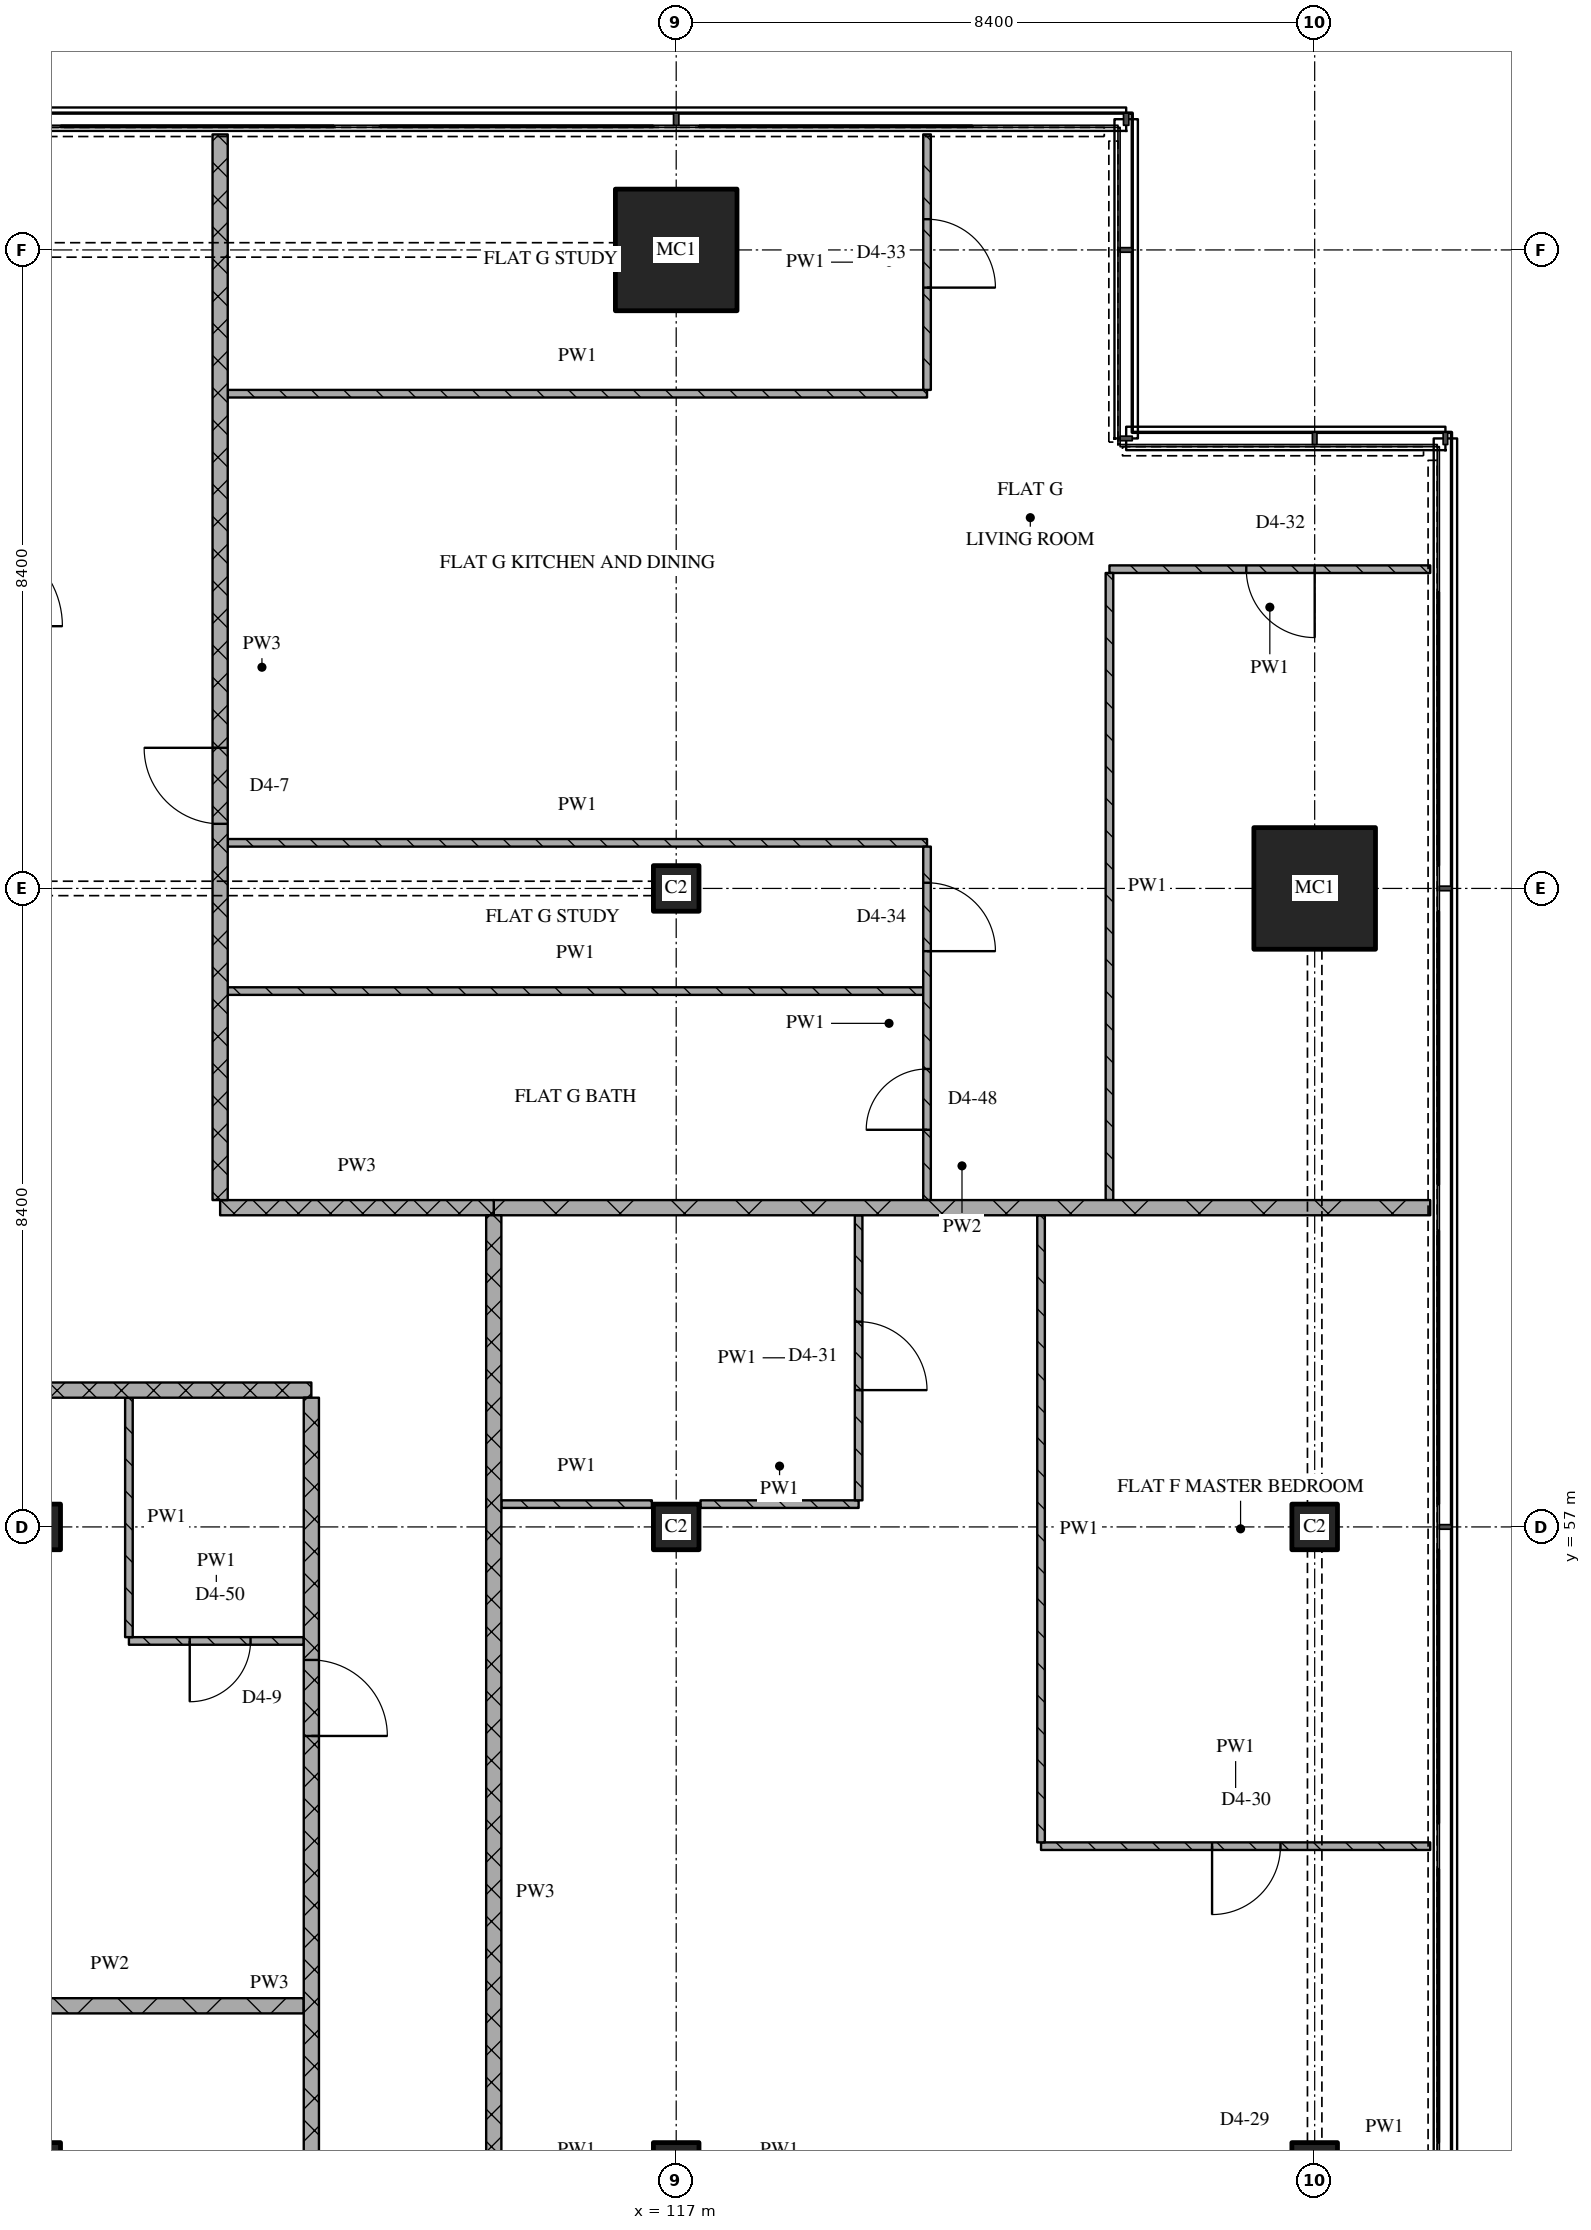
"""IFC4 building model, lengths in metres.
Left out: names, types, materials, properties, quantities, classifications, styles, units other than length and angle.
Written with IfcOpenShell. Run it as: python <this file> out.ifc"""

import sys

from ifc_helpers import new_model, si_unit, direction, frame, frame_2d, origin, origin_2d, place, context, subcontext, project, spatial, rectangle, extrude, element, fill, save


model = new_model("IFC4")
c1 = context("Model", 3, precision=1e-05, world=origin(), true_north=direction((0.0, 1.0)))
c2 = subcontext(c1, "Body", "Model", "MODEL_VIEW")
j1 = project(units=[si_unit("LENGTHUNIT", "METRE"), si_unit("PLANEANGLEUNIT", "RADIAN")], contexts=[c1])
p1 = place(None, origin())
s1 = spatial("IfcSite", under=j1, at=p1, CompositionType="ELEMENT")
p2 = place(p1, origin())
s2 = spatial("IfcBuilding", under=s1, at=p2, CompositionType="ELEMENT")
p3 = place(p2, frame((0.0, 0.0, 237.9)))
s3 = spatial("IfcBuildingStorey", under=s2, at=p3, CompositionType="ELEMENT", Elevation=237.9)
for number, where, z_axis, x_axis in (
    (1, (108.6, 48.6, 0.0), (0.0, 0.0, 1.0), (1.0, 0.0, 0.0)),
    (2, (108.6, 57.0, 0.0), (0.0, 0.0, 1.0), (1.0, 0.0, 0.0)),
    (3, (117.0, 48.6, 0.0), (0.0, 0.0, 1.0), (1.0, 0.0, 0.0)),
    (4, (117.0, 57.0, 0.0), (0.0, 0.0, 1.0), (1.0, 0.0, 0.0)),
    (5, (117.0, 65.4, 0.0), (0.0, 0.0, 1.0), (1.0, 0.0, 0.0)),
):
    element("IfcColumn", number, at=place(p3, frame(where, z_axis=z_axis, x_axis=x_axis)), inside=s3, PredefinedType="COLUMN", context=c2, shape_type="SweptSolid", body=[
        extrude(rectangle(XDim=0.6, YDim=0.6, at=origin_2d()), origin(), (0.0, 0.0, 1.0), 3.6),
    ])
p4 = place(p3, frame((117.0, 73.8, 0.0), z_axis=(0.0, 0.0, 1.0), x_axis=(1.0, 0.0, 0.0)))
e6 = element("IfcColumn", 6, at=p4, inside=s3, PredefinedType="COLUMN", context=c2, shape_type="SweptSolid", body=[
    extrude(rectangle(XDim=1.6, YDim=1.6, at=origin_2d()), origin(), (0.0, 0.0, 1.0), 3.6),
])
for number, where, z_axis, x_axis in (
    (7, (125.4, 48.6, 0.0), (0.0, 0.0, 1.0), (1.0, 0.0, 0.0)),
    (8, (125.4, 57.0, 0.0), (0.0, 0.0, 1.0), (1.0, 0.0, 0.0)),
):
    element("IfcColumn", number, at=place(p3, frame(where, z_axis=z_axis, x_axis=x_axis)), inside=s3, PredefinedType="COLUMN", context=c2, shape_type="SweptSolid", body=[
        extrude(rectangle(XDim=0.6, YDim=0.6, at=origin_2d()), origin(), (0.0, 0.0, 1.0), 3.6),
    ])
p5 = place(p3, frame((125.4, 65.4, 0.0), z_axis=(0.0, 0.0, 1.0), x_axis=(1.0, 0.0, 0.0)))
e9 = element("IfcColumn", 9, at=p5, inside=s3, PredefinedType="COLUMN", context=c2, shape_type="SweptSolid", body=[
    extrude(rectangle(XDim=1.6, YDim=1.6, at=origin_2d()), origin(), (0.0, 0.0, 1.0), 3.6),
])
p6 = place(p3, frame((107.0, 50.7, 0.0), z_axis=(0.0, 0.0, 1.0), x_axis=(1.0, 0.0, 0.0)))
e10 = element("IfcWall", 10, at=p6, inside=s3, PredefinedType="PARTITIONING", context=c2, shape_type="SweptSolid", body=[
    extrude(rectangle(XDim=5.1, YDim=0.2, at=frame_2d((2.55, 0.0))), origin(), (0.0, 0.0, 1.0), 3.32),
])
p7 = place(p3, frame((121.8, 52.8, 0.0), z_axis=(0.0, 0.0, 1.0), x_axis=(1.0, 0.0, 0.0)))
e11 = element("IfcWall", 11, at=p7, inside=s3, PredefinedType="PARTITIONING", context=c2, shape_type="SweptSolid", body=[
    extrude(rectangle(XDim=5.12, YDim=0.1, at=frame_2d((2.56, 0.0))), origin(), (0.0, 0.0, 1.0), 3.32),
])
p8 = place(p7, frame((2.25, 0.0, 0.0)))
e12 = element("IfcOpeningElement", 12, at=p8, cuts=e11, PredefinedType="OPENING", context=c2, shape_type="SweptSolid", body=[
    extrude(rectangle(XDim=0.9, YDim=2.1, at=frame_2d((0.45, 1.05))), frame((0.0, 0.06, 0.0), z_axis=(0.0, -1.0, 0.0), x_axis=(1.0, 0.0, 0.0)), (0.0, 0.0, 1.0), 0.12),
])
p9 = place(p3, frame((109.8, 55.5, 0.0), z_axis=(0.0, 0.0, 1.0), x_axis=(1.0, 0.0, 0.0)))
e13 = element("IfcWall", 13, at=p9, inside=s3, PredefinedType="PARTITIONING", context=c2, shape_type="SweptSolid", body=[
    extrude(rectangle(XDim=2.3, YDim=0.1, at=frame_2d((1.15, 0.0))), origin(), (0.0, 0.0, 1.0), 3.32),
])
p10 = place(p9, frame((0.8, 0.0, 0.0)))
e14 = element("IfcOpeningElement", 14, at=p10, cuts=e13, PredefinedType="OPENING", context=c2, shape_type="SweptSolid", body=[
    extrude(rectangle(XDim=0.8, YDim=2.1, at=frame_2d((0.4, 1.05))), frame((0.0, 0.06, 0.0), z_axis=(0.0, -1.0, 0.0), x_axis=(1.0, 0.0, 0.0)), (0.0, 0.0, 1.0), 0.12),
])
p11 = place(p3, frame((114.7, 57.3, 0.0), z_axis=(0.0, 0.0, 1.0), x_axis=(1.0, 0.0, 0.0)))
e15 = element("IfcWall", 15, at=p11, inside=s3, PredefinedType="PARTITIONING", context=c2, shape_type="SweptSolid", body=[
    extrude(rectangle(XDim=1.98, YDim=0.1, at=frame_2d((0.99, 0.0))), origin(), (0.0, 0.0, 1.0), 3.32),
])
p12 = place(p3, frame((117.32, 57.3, 0.0), z_axis=(0.0, 0.0, 1.0), x_axis=(1.0, 0.0, 0.0)))
e16 = element("IfcWall", 16, at=p12, inside=s3, PredefinedType="PARTITIONING", context=c2, shape_type="SweptSolid", body=[
    extrude(rectangle(XDim=2.08, YDim=0.1, at=frame_2d((1.04, 0.0))), origin(), (0.0, 0.0, 1.0), 3.32),
])
p13 = place(p3, frame((101.4, 58.8, 0.0), z_axis=(0.0, 0.0, 1.0), x_axis=(1.0, 0.0, 0.0)))
e17 = element("IfcWall", 17, at=p13, inside=s3, PredefinedType="PARTITIONING", context=c2, shape_type="SweptSolid", body=[
    extrude(rectangle(XDim=10.8, YDim=0.2, at=frame_2d((5.4, 0.0))), origin(), (0.0, 0.0, 1.0), 3.32),
])
p14 = place(p3, frame((111.0, 61.2, 0.0), z_axis=(0.0, 0.0, 1.0), x_axis=(1.0, 0.0, 0.0)))
e18 = element("IfcWall", 18, at=p14, inside=s3, PredefinedType="PARTITIONING", context=c2, shape_type="SweptSolid", body=[
    extrude(rectangle(XDim=3.6, YDim=0.2, at=frame_2d((1.8, 0.0))), origin(), (0.0, 0.0, 1.0), 3.32),
])
p15 = place(p3, frame((114.6, 61.2, 0.0), z_axis=(0.0, 0.0, 1.0), x_axis=(1.0, 0.0, 0.0)))
e19 = element("IfcWall", 19, at=p15, inside=s3, PredefinedType="PARTITIONING", context=c2, shape_type="SweptSolid", body=[
    extrude(rectangle(XDim=12.32, YDim=0.2, at=frame_2d((6.16, 0.0))), origin(), (0.0, 0.0, 1.0), 3.32),
])
p16 = place(p3, frame((111.1, 64.05, 0.0), z_axis=(0.0, 0.0, 1.0), x_axis=(1.0, 0.0, 0.0)))
e20 = element("IfcWall", 20, at=p16, inside=s3, PredefinedType="PARTITIONING", context=c2, shape_type="SweptSolid", body=[
    extrude(rectangle(XDim=9.15, YDim=0.1, at=frame_2d((4.575, 0.0))), origin(), (0.0, 0.0, 1.0), 3.32),
])
p17 = place(p3, frame((111.1, 66.0, 0.0), z_axis=(0.0, 0.0, 1.0), x_axis=(1.0, 0.0, 0.0)))
e21 = element("IfcWall", 21, at=p17, inside=s3, PredefinedType="PARTITIONING", context=c2, shape_type="SweptSolid", body=[
    extrude(rectangle(XDim=9.2, YDim=0.1, at=frame_2d((4.6, 0.0))), origin(), (0.0, 0.0, 1.0), 3.32),
])
p18 = place(p3, frame((126.92, 69.6, 0.0), z_axis=(0.0, 0.0, 1.0), x_axis=(-1.0, 0.0, 0.0)))
e22 = element("IfcWall", 22, at=p18, inside=s3, PredefinedType="PARTITIONING", context=c2, shape_type="SweptSolid", body=[
    extrude(rectangle(XDim=4.22, YDim=0.1, at=frame_2d((2.11, 0.0))), origin(), (0.0, 0.0, 1.0), 3.32),
])
p19 = place(p18, frame((1.52, 0.0, 0.0)))
e23 = element("IfcOpeningElement", 23, at=p19, cuts=e22, PredefinedType="OPENING", context=c2, shape_type="SweptSolid", body=[
    extrude(rectangle(XDim=0.9, YDim=2.1, at=frame_2d((0.45, 1.05))), frame((0.0, 0.06, 0.0), z_axis=(0.0, -1.0, 0.0), x_axis=(1.0, 0.0, 0.0)), (0.0, 0.0, 1.0), 0.12),
])
p20 = place(p3, frame((111.1, 71.909, 0.0), z_axis=(0.0, 0.0, 1.0), x_axis=(1.0, 0.0, 0.0)))
e24 = element("IfcWall", 24, at=p20, inside=s3, PredefinedType="PARTITIONING", context=c2, shape_type="SweptSolid", body=[
    extrude(rectangle(XDim=9.2, YDim=0.1, at=frame_2d((4.6, 0.0))), origin(), (0.0, 0.0, 1.0), 3.32),
])
p21 = place(p3, frame((109.8, 58.7, 0.0), z_axis=(0.0, 0.0, 1.0), x_axis=(0.0, -1.0, 0.0)))
e25 = element("IfcWall", 25, at=p21, inside=s3, PredefinedType="PARTITIONING", context=c2, shape_type="SweptSolid", body=[
    extrude(rectangle(XDim=3.15, YDim=0.1, at=frame_2d((1.575, 0.0))), origin(), (0.0, 0.0, 1.0), 3.32),
])
p22 = place(p3, frame((111.0, 75.32, 0.0), z_axis=(0.0, 0.0, 1.0), x_axis=(0.0, -1.0, 0.0)))
e26 = element("IfcWall", 26, at=p22, inside=s3, PredefinedType="PARTITIONING", context=c2, shape_type="SweptSolid", body=[
    extrude(rectangle(XDim=14.02, YDim=0.2, at=frame_2d((7.01, 0.0))), origin(), (0.0, 0.0, 1.0), 3.32),
])
p23 = place(p22, frame((8.07, 0.0, 0.0)))
e27 = element("IfcOpeningElement", 27, at=p23, cuts=e26, PredefinedType="OPENING", context=c2, shape_type="SweptSolid", body=[
    extrude(rectangle(XDim=1.0, YDim=2.1, at=frame_2d((0.5, 1.05))), frame((0.0, 0.11, 0.0), z_axis=(0.0, -1.0, 0.0), x_axis=(1.0, 0.0, 0.0)), (0.0, 0.0, 1.0), 0.22),
])
p24 = place(p3, frame((112.2, 43.3, 0.0), z_axis=(0.0, 0.0, 1.0), x_axis=(0.0, 1.0, 0.0)))
e28 = element("IfcWall", 28, at=p24, inside=s3, PredefinedType="PARTITIONING", context=c2, shape_type="SweptSolid", body=[
    extrude(rectangle(XDim=15.4, YDim=0.2, at=frame_2d((7.7, 0.0))), origin(), (0.0, 0.0, 1.0), 3.32),
])
p25 = place(p24, frame((10.95, 0.0, 0.0)))
e29 = element("IfcOpeningElement", 29, at=p25, cuts=e28, PredefinedType="OPENING", context=c2, shape_type="SweptSolid", body=[
    extrude(rectangle(XDim=1.0, YDim=2.1, at=frame_2d((0.5, 1.05))), frame((0.0, 0.11, 0.0), z_axis=(0.0, -1.0, 0.0), x_axis=(1.0, 0.0, 0.0)), (0.0, 0.0, 1.0), 0.22),
])
p26 = place(p3, frame((114.6, 61.1, 0.0), z_axis=(0.0, 0.0, 1.0), x_axis=(0.0, -1.0, 0.0)))
e30 = element("IfcWall", 30, at=p26, inside=s3, PredefinedType="PARTITIONING", context=c2, shape_type="SweptSolid", body=[
    extrude(rectangle(XDim=17.8, YDim=0.2, at=frame_2d((8.9, 0.0))), origin(), (0.0, 0.0, 1.0), 3.32),
])
p27 = place(p3, frame((119.4, 57.35, 0.0), z_axis=(0.0, 0.0, 1.0), x_axis=(0.0, 1.0, 0.0)))
e31 = element("IfcWall", 31, at=p27, inside=s3, PredefinedType="PARTITIONING", context=c2, shape_type="SweptSolid", body=[
    extrude(rectangle(XDim=3.75, YDim=0.1, at=frame_2d((1.875, 0.0))), origin(), (0.0, 0.0, 1.0), 3.32),
])
p28 = place(p27, frame((1.45, 0.0, 0.0)))
e32 = element("IfcOpeningElement", 32, at=p28, cuts=e31, PredefinedType="OPENING", context=c2, shape_type="SweptSolid", body=[
    extrude(rectangle(XDim=0.9, YDim=2.1, at=frame_2d((0.45, 1.05))), frame((0.0, 0.06, 0.0), z_axis=(0.0, -1.0, 0.0), x_axis=(1.0, 0.0, 0.0)), (0.0, 0.0, 1.0), 0.12),
])
p29 = place(p3, frame((120.3, 61.3, 0.0), z_axis=(0.0, 0.0, 1.0), x_axis=(0.0, 1.0, 0.0)))
e33 = element("IfcWall", 33, at=p29, inside=s3, PredefinedType="PARTITIONING", context=c2, shape_type="SweptSolid", body=[
    extrude(rectangle(XDim=4.65, YDim=0.1, at=frame_2d((2.325, 0.0))), origin(), (0.0, 0.0, 1.0), 3.32),
])
p30 = place(p29, frame((0.925, 0.0, 0.0)))
e34 = element("IfcOpeningElement", 34, at=p30, cuts=e33, PredefinedType="OPENING", context=c2, shape_type="SweptSolid", body=[
    extrude(rectangle(XDim=0.8, YDim=2.1, at=frame_2d((0.4, 1.05))), frame((0.0, 0.06, 0.0), z_axis=(0.0, -1.0, 0.0), x_axis=(1.0, 0.0, 0.0)), (0.0, 0.0, 1.0), 0.12),
])
p31 = place(p29, frame((3.275, 0.0, 0.0)))
e35 = element("IfcOpeningElement", 35, at=p31, cuts=e33, PredefinedType="OPENING", context=c2, shape_type="SweptSolid", body=[
    extrude(rectangle(XDim=0.9, YDim=2.1, at=frame_2d((0.45, 1.05))), frame((0.0, 0.06, 0.0), z_axis=(0.0, -1.0, 0.0), x_axis=(1.0, 0.0, 0.0)), (0.0, 0.0, 1.0), 0.12),
])
p32 = place(p3, frame((120.3, 71.958, 0.0), z_axis=(0.0, 0.0, 1.0), x_axis=(0.0, 1.0, 0.0)))
e36 = element("IfcWall", 36, at=p32, inside=s3, PredefinedType="PARTITIONING", context=c2, shape_type="SweptSolid", body=[
    extrude(rectangle(XDim=3.362, YDim=0.1, at=frame_2d((1.681, 0.0))), origin(), (0.0, 0.0, 1.0), 3.32),
])
p33 = place(p32, frame((1.346, 0.0, 0.0)))
e37 = element("IfcOpeningElement", 37, at=p33, cuts=e36, PredefinedType="OPENING", context=c2, shape_type="SweptSolid", body=[
    extrude(rectangle(XDim=0.9, YDim=2.1, at=frame_2d((0.45, 1.05))), frame((0.0, 0.06, 0.0), z_axis=(0.0, -1.0, 0.0), x_axis=(1.0, 0.0, 0.0)), (0.0, 0.0, 1.0), 0.12),
])
for number, where, z_axis, x_axis in (
    (38, (121.8, 61.1, 0.0), (0.0, 0.0, 1.0), (0.0, -1.0, 0.0)),
    (39, (122.7, 69.55, 0.0), (0.0, 0.0, 1.0), (0.0, -1.0, 0.0)),
):
    element("IfcWall", number, at=place(p3, frame(where, z_axis=z_axis, x_axis=x_axis)), inside=s3, PredefinedType="PARTITIONING", context=c2, shape_type="SweptSolid", body=[
        extrude(rectangle(XDim=8.25, YDim=0.1, at=frame_2d((4.125, 0.0))), origin(), (0.0, 0.0, 1.0), 3.32),
    ])
p34 = place(p8, origin())
e40 = element("IfcDoor", 40, at=p34, inside=s3, OperationType="SINGLE_SWING_RIGHT", PredefinedType="DOOR", context=c2, shape_type="SweptSolid", body=[
    extrude(rectangle(XDim=0.9, YDim=2.1, at=frame_2d((0.45, 1.05))), frame((0.0, 0.025, 0.0), z_axis=(0.0, -1.0, 0.0), x_axis=(1.0, 0.0, 0.0)), (0.0, 0.0, 1.0), 0.05),
])
fill(e12, e40)
p35 = place(p10, origin())
e41 = element("IfcDoor", 41, at=p35, inside=s3, OperationType="SINGLE_SWING_RIGHT", PredefinedType="DOOR", context=c2, shape_type="SweptSolid", body=[
    extrude(rectangle(XDim=0.8, YDim=2.1, at=frame_2d((0.4, 1.05))), frame((0.0, 0.025, 0.0), z_axis=(0.0, -1.0, 0.0), x_axis=(1.0, 0.0, 0.0)), (0.0, 0.0, 1.0), 0.05),
])
fill(e14, e41)
p36 = place(p19, origin())
e42 = element("IfcDoor", 42, at=p36, inside=s3, OperationType="SINGLE_SWING_LEFT", PredefinedType="DOOR", context=c2, shape_type="SweptSolid", body=[
    extrude(rectangle(XDim=0.9, YDim=2.1, at=frame_2d((0.45, 1.05))), frame((0.0, 0.025, 0.0), z_axis=(0.0, -1.0, 0.0), x_axis=(1.0, 0.0, 0.0)), (0.0, 0.0, 1.0), 0.05),
])
fill(e23, e42)
p37 = place(p23, origin())
e43 = element("IfcDoor", 43, at=p37, inside=s3, OperationType="SINGLE_SWING_RIGHT", PredefinedType="DOOR", context=c2, shape_type="SweptSolid", body=[
    extrude(rectangle(XDim=1.0, YDim=2.1, at=frame_2d((0.5, 1.05))), frame((0.0, 0.025, 0.0), z_axis=(0.0, -1.0, 0.0), x_axis=(1.0, 0.0, 0.0)), (0.0, 0.0, 1.0), 0.05),
])
fill(e27, e43)
p38 = place(p25, origin())
e44 = element("IfcDoor", 44, at=p38, inside=s3, OperationType="SINGLE_SWING_RIGHT", PredefinedType="DOOR", context=c2, shape_type="SweptSolid", body=[
    extrude(rectangle(XDim=1.0, YDim=2.1, at=frame_2d((0.5, 1.05))), frame((0.0, 0.025, 0.0), z_axis=(0.0, -1.0, 0.0), x_axis=(1.0, 0.0, 0.0)), (0.0, 0.0, 1.0), 0.05),
])
fill(e29, e44)
p39 = place(p28, origin())
e45 = element("IfcDoor", 45, at=p39, inside=s3, OperationType="SINGLE_SWING_RIGHT", PredefinedType="DOOR", context=c2, shape_type="SweptSolid", body=[
    extrude(rectangle(XDim=0.9, YDim=2.1, at=frame_2d((0.45, 1.05))), frame((0.0, 0.025, 0.0), z_axis=(0.0, -1.0, 0.0), x_axis=(1.0, 0.0, 0.0)), (0.0, 0.0, 1.0), 0.05),
])
fill(e32, e45)
p40 = place(p30, origin())
e46 = element("IfcDoor", 46, at=p40, inside=s3, OperationType="SINGLE_SWING_LEFT", PredefinedType="DOOR", context=c2, shape_type="SweptSolid", body=[
    extrude(rectangle(XDim=0.8, YDim=2.1, at=frame_2d((0.4, 1.05))), frame((0.0, 0.025, 0.0), z_axis=(0.0, -1.0, 0.0), x_axis=(1.0, 0.0, 0.0)), (0.0, 0.0, 1.0), 0.05),
])
fill(e34, e46)
p41 = place(p31, origin())
e47 = element("IfcDoor", 47, at=p41, inside=s3, OperationType="SINGLE_SWING_RIGHT", PredefinedType="DOOR", context=c2, shape_type="SweptSolid", body=[
    extrude(rectangle(XDim=0.9, YDim=2.1, at=frame_2d((0.45, 1.05))), frame((0.0, 0.025, 0.0), z_axis=(0.0, -1.0, 0.0), x_axis=(1.0, 0.0, 0.0)), (0.0, 0.0, 1.0), 0.05),
])
fill(e35, e47)
p42 = place(p33, origin())
e48 = element("IfcDoor", 48, at=p42, inside=s3, OperationType="SINGLE_SWING_RIGHT", PredefinedType="DOOR", context=c2, shape_type="SweptSolid", body=[
    extrude(rectangle(XDim=0.9, YDim=2.1, at=frame_2d((0.45, 1.05))), frame((0.0, 0.025, 0.0), z_axis=(0.0, -1.0, 0.0), x_axis=(1.0, 0.0, 0.0)), (0.0, 0.0, 1.0), 0.05),
])
fill(e37, e48)
save(model, sys.argv[1])
